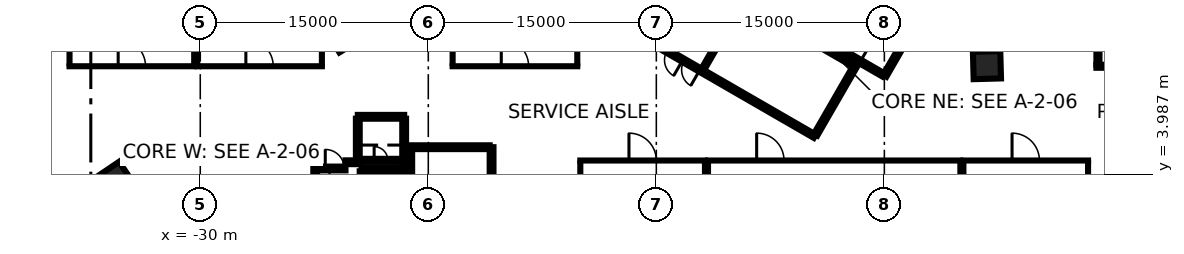
"""IFC4 building model, lengths in metres.
Left out: names, types, materials, properties, quantities, classifications, styles, units other than length and angle.
Written with IfcOpenShell. Run it as: python <this file> out.ifc"""

import sys

from ifc_helpers import new_model, si_unit, direction, frame, frame_2d, origin, origin_2d, place, context, subcontext, project, spatial, rectangle, extrude, element, fill, save


model = new_model("IFC4")
c1 = context("Model", 3, precision=1e-05, world=origin(), true_north=direction((0.0, 1.0)))
c2 = subcontext(c1, "Body", "Model", "MODEL_VIEW")
j1 = project(units=[si_unit("LENGTHUNIT", "METRE"), si_unit("PLANEANGLEUNIT", "RADIAN")], contexts=[c1])
p1 = place(None, origin())
s1 = spatial("IfcSite", under=j1, at=p1, CompositionType="ELEMENT")
p2 = place(p1, origin())
s2 = spatial("IfcBuilding", under=s1, at=p2, CompositionType="ELEMENT")
p3 = place(p2, frame((0.0, 0.0, -7.2)))
s3 = spatial("IfcBuildingStorey", under=s2, at=p3, CompositionType="ELEMENT", Elevation=-7.2)
for number, where, z_axis, x_axis in (
    (1, (21.749, 11.174, -0.4), (0.0, 0.0, 1.0), (1.0, 0.027, 0.0)),
    (2, (-35.583, 3.565, -0.4), (0.0, 0.0, 1.0), (-0.559, 0.829, 0.0)),
):
    element("IfcColumn", number, at=place(p3, frame(where, z_axis=z_axis, x_axis=x_axis)), inside=s3, PredefinedType="COLUMN", context=c2, shape_type="SweptSolid", body=[
        extrude(rectangle(XDim=1.8, YDim=1.8, at=origin_2d()), origin(), (0.0, 0.0, 1.0), 3.6),
    ])
p4 = place(p3, frame((-10.837, 5.775, 0.0), z_axis=(0.0, 0.0, 1.0), x_axis=(0.0, -1.0, 0.0)))
e3 = element("IfcWall", 3, at=p4, inside=s3, PredefinedType="SHEAR", context=c2, shape_type="SweptSolid", body=[
    extrude(rectangle(XDim=11.55, YDim=0.25, at=frame_2d((5.775, 0.0))), origin(), (0.0, 0.0, 1.0), 3.2),
])
p5 = place(p4, frame((10.025, 0.0, 0.0)))
e4 = element("IfcOpeningElement", 4, at=p5, cuts=e3, PredefinedType="OPENING", context=c2, shape_type="SweptSolid", body=[
    extrude(rectangle(XDim=1.2, YDim=2.1, at=frame_2d((0.6, 1.05))), frame((0.0, 0.135, 0.0), z_axis=(0.0, -1.0, 0.0), x_axis=(1.0, 0.0, 0.0)), (0.0, 0.0, 1.0), 0.27),
])
p6 = place(p4, frame((8.725, 0.0, 0.0)))
e5 = element("IfcOpeningElement", 5, at=p6, cuts=e3, PredefinedType="OPENING", context=c2, shape_type="SweptSolid", body=[
    extrude(rectangle(XDim=1.2, YDim=2.1, at=frame_2d((0.6, 1.05))), frame((0.0, 0.135, 0.0), z_axis=(0.0, -1.0, 0.0), x_axis=(1.0, 0.0, 0.0)), (0.0, 0.0, 1.0), 0.27),
])
p7 = place(p3, frame((-16.472, 5.775, 0.0), z_axis=(0.0, 0.0, 1.0), x_axis=(1.0, 0.0, 0.0)))
e6 = element("IfcWall", 6, at=p7, inside=s3, PredefinedType="SHEAR", context=c2, shape_type="SweptSolid", body=[
    extrude(rectangle(XDim=5.51, YDim=0.25, at=frame_2d((2.755, 0.0))), origin(), (0.0, 0.0, 1.0), 3.2),
])
p8 = place(p3, frame((-19.637, 7.775, 0.0), z_axis=(0.0, 0.0, 1.0), x_axis=(1.0, 0.0, 0.0)))
e7 = element("IfcWall", 7, at=p8, inside=s3, PredefinedType="SHEAR", context=c2, shape_type="SweptSolid", body=[
    extrude(rectangle(XDim=3.05, YDim=0.25, at=frame_2d((1.525, 0.0))), origin(), (0.0, 0.0, 1.0), 3.2),
])
for number, where, z_axis, x_axis in (
    (8, (-16.587, 7.65, 0.0), (0.0, 0.0, 1.0), (0.0, -1.0, 0.0)),
    (9, (-19.637, 4.785, 0.0), (0.0, 0.0, 1.0), (0.0, 1.0, 0.0)),
):
    element("IfcWall", number, at=place(p3, frame(where, z_axis=z_axis, x_axis=x_axis)), inside=s3, PredefinedType="SHEAR", context=c2, shape_type="SweptSolid", body=[
        extrude(rectangle(XDim=2.865, YDim=0.25, at=frame_2d((1.432, 0.0))), origin(), (0.0, 0.0, 1.0), 3.2),
    ])
p9 = place(p3, frame((-16.302, 4.315, 0.0), z_axis=(0.0, 0.0, 1.0), x_axis=(-1.0, 0.0, 0.0)))
e10 = element("IfcWall", 10, at=p9, inside=s3, PredefinedType="SHEAR", context=c2, shape_type="SweptSolid", body=[
    extrude(rectangle(XDim=3.085, YDim=0.25, at=frame_2d((1.542, 0.0))), origin(), (0.0, 0.0, 1.0), 3.2),
])
p10 = place(p3, frame((-16.187, 3.2, 0.0), z_axis=(0.0, 0.0, 1.0), x_axis=(0.0, 1.0, 0.0)))
e11 = element("IfcWall", 11, at=p10, inside=s3, PredefinedType="SHEAR", context=c2, shape_type="SweptSolid", body=[
    extrude(rectangle(XDim=2.449, YDim=0.25, at=frame_2d((1.225, 0.0))), origin(), (0.0, 0.0, 1.0), 3.2),
])
p11 = place(p3, frame((-22.437, 2.4, 0.0), z_axis=(0.0, 0.0, 1.0), x_axis=(0.0, 1.0, 0.0)))
e12 = element("IfcWall", 12, at=p11, inside=s3, PredefinedType="SHEAR", context=c2, shape_type="SweptSolid", body=[
    extrude(rectangle(XDim=1.975, YDim=0.25, at=frame_2d((0.987, 0.0))), origin(), (0.0, 0.0, 1.0), 3.2),
])
p12 = place(p3, frame((-22.312, 4.375, 0.0), z_axis=(0.0, 0.0, 1.0), x_axis=(1.0, 0.0, 0.0)))
e13 = element("IfcWall", 13, at=p12, inside=s3, PredefinedType="SHEAR", context=c2, shape_type="SweptSolid", body=[
    extrude(rectangle(XDim=1.865, YDim=0.25, at=frame_2d((0.932, 0.0))), origin(), (0.0, 0.0, 1.0), 3.2),
])
p13 = place(p12, frame((0.535, 0.0, 0.0)))
e14 = element("IfcOpeningElement", 14, at=p13, cuts=e13, PredefinedType="OPENING", context=c2, shape_type="SweptSolid", body=[
    extrude(rectangle(XDim=1.25, YDim=2.1, at=frame_2d((0.625, 1.05))), frame((0.0, 0.135, 0.0), z_axis=(0.0, -1.0, 0.0), x_axis=(1.0, 0.0, 0.0)), (0.0, 0.0, 1.0), 0.27),
])
p14 = place(p3, frame((-19.387, 4.19, 0.0), z_axis=(0.0, 0.0, 1.0), x_axis=(0.0, -1.0, 0.0)))
e15 = element("IfcWall", 15, at=p14, inside=s3, PredefinedType="SHEAR", context=c2, shape_type="SweptSolid", body=[
    extrude(rectangle(XDim=0.989, YDim=0.25, at=frame_2d((0.495, 0.0))), origin(), (0.0, 0.0, 1.0), 3.2),
])
p15 = place(p3, frame((-20.447, 4.785, 0.0), z_axis=(0.0, 0.0, 1.0), x_axis=(1.0, 0.0, 0.0)))
e16 = element("IfcWall", 16, at=p15, inside=s3, PredefinedType="SHEAR", context=c2, shape_type="SweptSolid", body=[
    extrude(rectangle(XDim=0.685, YDim=0.25, at=frame_2d((0.342, 0.0))), origin(), (0.0, 0.0, 1.0), 3.2),
])
p16 = place(p3, frame((-16.577, 4.785, 0.0), z_axis=(0.0, 0.0, 1.0), x_axis=(0.0, -1.0, 0.0)))
e17 = element("IfcWall", 17, at=p16, inside=s3, PredefinedType="SHEAR", context=c2, shape_type="SweptSolid", body=[
    extrude(rectangle(XDim=0.344, YDim=0.25, at=frame_2d((0.172, 0.0))), origin(), (0.0, 0.0, 1.0), 3.2),
])
p17 = place(p3, frame((-19.511, 4.91, 0.0), z_axis=(0.0, 0.0, 1.0), x_axis=(1.0, 0.0, 0.0)))
e18 = element("IfcWall", 18, at=p17, inside=s3, PredefinedType="SHEAR", context=c2, shape_type="SweptSolid", body=[
    extrude(rectangle(XDim=2.798, YDim=0.2, at=frame_2d((1.399, 0.0))), origin(), (0.0, 0.0, 1.0), 3.2),
])
p18 = place(p17, frame((0.949, 0.0, 0.0)))
e19 = element("IfcOpeningElement", 19, at=p18, cuts=e18, PredefinedType="OPENING", context=c2, shape_type="SweptSolid", body=[
    extrude(rectangle(XDim=0.9, YDim=2.1, at=frame_2d((0.45, 1.05))), frame((0.0, 0.11, 0.0), z_axis=(0.0, -1.0, 0.0), x_axis=(1.0, 0.0, 0.0)), (0.0, 0.0, 1.0), 0.22),
])
p19 = place(p3, frame((10.42, 6.498, 0.0), z_axis=(0.0, 0.0, 1.0), x_axis=(-0.866021906294, 0.500006057782, 0.0)))
e20 = element("IfcWall", 20, at=p19, inside=s3, PredefinedType="SHEAR", context=c2, shape_type="SweptSolid", body=[
    extrude(rectangle(XDim=11.55, YDim=0.25, at=frame_2d((5.775, 0.0))), origin(), (0.0, 0.0, 1.0), 3.2),
])
p20 = place(p19, frame((10.025, 0.0, 0.0)))
e21 = element("IfcOpeningElement", 21, at=p20, cuts=e20, PredefinedType="OPENING", context=c2, shape_type="SweptSolid", body=[
    extrude(rectangle(XDim=1.2, YDim=2.1, at=frame_2d((0.6, 1.05))), frame((0.0, 0.135, 0.0), z_axis=(0.0, -1.0, 0.0), x_axis=(1.0, 0.0, 0.0)), (0.0, 0.0, 1.0), 0.27),
])
p21 = place(p19, frame((8.725, 0.0, 0.0)))
e22 = element("IfcOpeningElement", 22, at=p21, cuts=e20, PredefinedType="OPENING", context=c2, shape_type="SweptSolid", body=[
    extrude(rectangle(XDim=1.2, YDim=2.1, at=frame_2d((0.6, 1.05))), frame((0.0, 0.135, 0.0), z_axis=(0.0, -1.0, 0.0), x_axis=(1.0, 0.0, 0.0)), (0.0, 0.0, 1.0), 0.27),
])
p22 = place(p3, frame((13.238, 11.378, 0.0), z_axis=(0.0, 0.0, 1.0), x_axis=(-0.500008851346, -0.866020293397, 0.0)))
e23 = element("IfcWall", 23, at=p22, inside=s3, PredefinedType="SHEAR", context=c2, shape_type="SweptSolid", body=[
    extrude(rectangle(XDim=5.51, YDim=0.25, at=frame_2d((2.755, 0.0))), origin(), (0.0, 0.0, 1.0), 3.2),
])
p23 = place(p3, frame((16.552, 13.119, 0.0), z_axis=(0.0, 0.0, 1.0), x_axis=(-0.499978833458, -0.866037623948, 0.0)))
e24 = element("IfcWall", 24, at=p23, inside=s3, PredefinedType="SHEAR", context=c2, shape_type="SweptSolid", body=[
    extrude(rectangle(XDim=3.05, YDim=0.25, at=frame_2d((1.525, 0.0))), origin(), (0.0, 0.0, 1.0), 3.2),
])
p24 = place(p3, frame((14.918, 10.54, 0.0), z_axis=(0.0, 0.0, 1.0), x_axis=(-0.866063538972, 0.499933942099, 0.0)))
e25 = element("IfcWall", 25, at=p24, inside=s3, PredefinedType="SHEAR", context=c2, shape_type="SweptSolid", body=[
    extrude(rectangle(XDim=2.865, YDim=0.25, at=frame_2d((1.432, 0.0))), origin(), (0.0, 0.0, 1.0), 3.2),
])
p25 = place(p3, frame((11.888, 11.961, 0.0), z_axis=(0.0, 0.0, 1.0), x_axis=(0.500003324108, 0.866023484601, 0.0)))
e26 = element("IfcWall", 26, at=p25, inside=s3, PredefinedType="SHEAR", context=c2, shape_type="SweptSolid", body=[
    extrude(rectangle(XDim=3.085, YDim=0.25, at=frame_2d((1.542, 0.0))), origin(), (0.0, 0.0, 1.0), 3.2),
])
p26 = place(p3, frame((10.865, 12.418, 0.0), z_axis=(0.0, 0.0, 1.0), x_axis=(0.866026229868, -0.499998569178, 0.0)))
e27 = element("IfcWall", 27, at=p26, inside=s3, PredefinedType="SHEAR", context=c2, shape_type="SweptSolid", body=[
    extrude(rectangle(XDim=2.449, YDim=0.25, at=frame_2d((1.225, 0.0))), origin(), (0.0, 0.0, 1.0), 3.2),
])
p27 = place(p3, frame((12.433, 11.964, 0.0), z_axis=(0.0, 0.0, 1.0), x_axis=(-0.866055875208, 0.499947218231, 0.0)))
e28 = element("IfcWall", 28, at=p27, inside=s3, PredefinedType="SHEAR", context=c2, shape_type="SweptSolid", body=[
    extrude(rectangle(XDim=0.345, YDim=0.25, at=frame_2d((0.172, 0.0))), origin(), (0.0, 0.0, 1.0), 3.2),
])
p28 = place(p3, frame((3.057, 10.895, 0.0), z_axis=(0.0, 0.0, 1.0), x_axis=(0.500012186204, 0.866018367962, 0.0)))
e29 = element("IfcWall", 29, at=p28, inside=s3, PredefinedType="SHEAR", context=c2, shape_type="SweptSolid", body=[
    extrude(rectangle(XDim=5.349, YDim=0.2, at=frame_2d((2.674, 0.0))), origin(), (0.0, 0.0, 1.0), 3.2),
])
p29 = place(p28, frame((2.099, 0.0, 0.0)))
e30 = element("IfcOpeningElement", 30, at=p29, cuts=e29, PredefinedType="OPENING", context=c2, shape_type="SweptSolid", body=[
    extrude(rectangle(XDim=0.9, YDim=2.1, at=frame_2d((0.45, 1.05))), frame((0.0, 0.11, 0.0), z_axis=(0.0, -1.0, 0.0), x_axis=(1.0, 0.0, 0.0)), (0.0, 0.0, 1.0), 0.22),
])
p30 = place(p3, frame((14.008, 14.442, 0.0), z_axis=(0.0, 0.0, 1.0), x_axis=(-0.499986818241, -0.866033014143, 0.0)))
e31 = element("IfcWall", 31, at=p30, inside=s3, PredefinedType="SHEAR", context=c2, shape_type="SweptSolid", body=[
    extrude(rectangle(XDim=2.798, YDim=0.2, at=frame_2d((1.399, 0.0))), origin(), (0.0, 0.0, 1.0), 3.2),
])
p31 = place(p30, frame((0.949, 0.0, 0.0)))
e32 = element("IfcOpeningElement", 32, at=p31, cuts=e31, PredefinedType="OPENING", context=c2, shape_type="SweptSolid", body=[
    extrude(rectangle(XDim=0.9, YDim=2.1, at=frame_2d((0.45, 1.05))), frame((0.0, 0.11, 0.0), z_axis=(0.0, -1.0, 0.0), x_axis=(1.0, 0.0, 0.0)), (0.0, 0.0, 1.0), 0.22),
])
p32 = place(p3, frame((-5.1, 4.9, 0.0), z_axis=(0.0, 0.0, 1.0), x_axis=(1.0, 0.0, 0.0)))
e33 = element("IfcWall", 33, at=p32, inside=s3, PredefinedType="PARTITIONING", context=c2, shape_type="SweptSolid", body=[
    extrude(rectangle(XDim=8.4, YDim=0.2, at=frame_2d((4.2, 0.0))), origin(), (0.0, 0.0, 1.0), 3.2),
])
p33 = place(p32, frame((3.3, 0.0, 0.0)))
e34 = element("IfcOpeningElement", 34, at=p33, cuts=e33, PredefinedType="OPENING", context=c2, shape_type="SweptSolid", body=[
    extrude(rectangle(XDim=1.8, YDim=2.1, at=frame_2d((0.9, 1.05))), frame((0.0, 0.11, 0.0), z_axis=(0.0, -1.0, 0.0), x_axis=(1.0, 0.0, 0.0)), (0.0, 0.0, 1.0), 0.22),
])
for number, where, z_axis, x_axis in (
    (35, (-5.0, 0.6, 0.0), (0.0, 0.0, 1.0), (0.0, 1.0, 0.0)),
    (36, (3.2, 0.6, 0.0), (0.0, 0.0, 1.0), (0.0, 1.0, 0.0)),
):
    element("IfcWall", number, at=place(p3, frame(where, z_axis=z_axis, x_axis=x_axis)), inside=s3, PredefinedType="PARTITIONING", context=c2, shape_type="SweptSolid", body=[
        extrude(rectangle(XDim=4.2, YDim=0.2, at=frame_2d((2.1, 0.0))), origin(), (0.0, 0.0, 1.0), 3.2),
    ])
p34 = place(p3, frame((3.3, 4.9, 0.0), z_axis=(0.0, 0.0, 1.0), x_axis=(1.0, 0.0, 0.0)))
e37 = element("IfcWall", 37, at=p34, inside=s3, PredefinedType="PARTITIONING", context=c2, shape_type="SweptSolid", body=[
    extrude(rectangle(XDim=16.8, YDim=0.2, at=frame_2d((8.4, 0.0))), origin(), (0.0, 0.0, 1.0), 3.2),
])
p35 = place(p34, frame((3.3, 0.0, 0.0)))
e38 = element("IfcOpeningElement", 38, at=p35, cuts=e37, PredefinedType="OPENING", context=c2, shape_type="SweptSolid", body=[
    extrude(rectangle(XDim=1.8, YDim=2.1, at=frame_2d((0.9, 1.05))), frame((0.0, 0.11, 0.0), z_axis=(0.0, -1.0, 0.0), x_axis=(1.0, 0.0, 0.0)), (0.0, 0.0, 1.0), 0.22),
])
for number, where, z_axis, x_axis in (
    (39, (3.4, 0.6, 0.0), (0.0, 0.0, 1.0), (0.0, 1.0, 0.0)),
    (40, (20.0, 0.6, 0.0), (0.0, 0.0, 1.0), (0.0, 1.0, 0.0)),
):
    element("IfcWall", number, at=place(p3, frame(where, z_axis=z_axis, x_axis=x_axis)), inside=s3, PredefinedType="PARTITIONING", context=c2, shape_type="SweptSolid", body=[
        extrude(rectangle(XDim=4.2, YDim=0.2, at=frame_2d((2.1, 0.0))), origin(), (0.0, 0.0, 1.0), 3.2),
    ])
p36 = place(p3, frame((20.1, 4.9, 0.0), z_axis=(0.0, 0.0, 1.0), x_axis=(1.0, 0.0, 0.0)))
e41 = element("IfcWall", 41, at=p36, inside=s3, PredefinedType="PARTITIONING", context=c2, shape_type="SweptSolid", body=[
    extrude(rectangle(XDim=8.4, YDim=0.2, at=frame_2d((4.2, 0.0))), origin(), (0.0, 0.0, 1.0), 3.2),
])
p37 = place(p36, frame((3.3, 0.0, 0.0)))
e42 = element("IfcOpeningElement", 42, at=p37, cuts=e41, PredefinedType="OPENING", context=c2, shape_type="SweptSolid", body=[
    extrude(rectangle(XDim=1.8, YDim=2.1, at=frame_2d((0.9, 1.05))), frame((0.0, 0.11, 0.0), z_axis=(0.0, -1.0, 0.0), x_axis=(1.0, 0.0, 0.0)), (0.0, 0.0, 1.0), 0.22),
])
p38 = place(p3, frame((20.2, 0.6, 0.0), z_axis=(0.0, 0.0, 1.0), x_axis=(0.0, 1.0, 0.0)))
e43 = element("IfcWall", 43, at=p38, inside=s3, PredefinedType="PARTITIONING", context=c2, shape_type="SweptSolid", body=[
    extrude(rectangle(XDim=4.2, YDim=0.2, at=frame_2d((2.1, 0.0))), origin(), (0.0, 0.0, 1.0), 3.2),
])
p39 = place(p3, frame((28.4, 0.4, 0.0), z_axis=(0.0, 0.0, 1.0), x_axis=(0.0, 1.0, 0.0)))
e44 = element("IfcWall", 44, at=p39, inside=s3, PredefinedType="PARTITIONING", context=c2, shape_type="SweptSolid", body=[
    extrude(rectangle(XDim=4.4, YDim=0.2, at=frame_2d((2.2, 0.0))), origin(), (0.0, 0.0, 1.0), 3.2),
])
p40 = place(p3, frame((-38.7, 11.1, 0.0), z_axis=(0.0, 0.0, 1.0), x_axis=(1.0, 0.0, 0.0)))
e45 = element("IfcWall", 45, at=p40, inside=s3, PredefinedType="PARTITIONING", context=c2, shape_type="SweptSolid", body=[
    extrude(rectangle(XDim=8.4, YDim=0.2, at=frame_2d((4.2, 0.0))), origin(), (0.0, 0.0, 1.0), 3.2),
])
p41 = place(p40, frame((3.3, 0.0, 0.0)))
e46 = element("IfcOpeningElement", 46, at=p41, cuts=e45, PredefinedType="OPENING", context=c2, shape_type="SweptSolid", body=[
    extrude(rectangle(XDim=1.8, YDim=2.1, at=frame_2d((0.9, 1.05))), frame((0.0, 0.11, 0.0), z_axis=(0.0, -1.0, 0.0), x_axis=(1.0, 0.0, 0.0)), (0.0, 0.0, 1.0), 0.22),
])
p42 = place(p3, frame((-38.6, 11.2, 0.0), z_axis=(0.0, 0.0, 1.0), x_axis=(0.0, 1.0, 0.0)))
e47 = element("IfcWall", 47, at=p42, inside=s3, PredefinedType="PARTITIONING", context=c2, shape_type="SweptSolid", body=[
    extrude(rectangle(XDim=4.2, YDim=0.2, at=frame_2d((2.1, 0.0))), origin(), (0.0, 0.0, 1.0), 3.2),
])
p43 = place(p3, frame((-30.4, 11.2, 0.0), z_axis=(0.0, 0.0, 1.0), x_axis=(0.0, 1.0, 0.0)))
e48 = element("IfcWall", 48, at=p43, inside=s3, PredefinedType="PARTITIONING", context=c2, shape_type="SweptSolid", body=[
    extrude(rectangle(XDim=4.4, YDim=0.2, at=frame_2d((2.2, 0.0))), origin(), (0.0, 0.0, 1.0), 3.2),
])
p44 = place(p3, frame((-30.3, 11.1, 0.0), z_axis=(0.0, 0.0, 1.0), x_axis=(1.0, 0.0, 0.0)))
e49 = element("IfcWall", 49, at=p44, inside=s3, PredefinedType="PARTITIONING", context=c2, shape_type="SweptSolid", body=[
    extrude(rectangle(XDim=8.4, YDim=0.2, at=frame_2d((4.2, 0.0))), origin(), (0.0, 0.0, 1.0), 3.2),
])
p45 = place(p44, frame((3.3, 0.0, 0.0)))
e50 = element("IfcOpeningElement", 50, at=p45, cuts=e49, PredefinedType="OPENING", context=c2, shape_type="SweptSolid", body=[
    extrude(rectangle(XDim=1.8, YDim=2.1, at=frame_2d((0.9, 1.05))), frame((0.0, 0.11, 0.0), z_axis=(0.0, -1.0, 0.0), x_axis=(1.0, 0.0, 0.0)), (0.0, 0.0, 1.0), 0.22),
])
p46 = place(p3, frame((-30.2, 11.2, 0.0), z_axis=(0.0, 0.0, 1.0), x_axis=(0.0, 1.0, 0.0)))
e51 = element("IfcWall", 51, at=p46, inside=s3, PredefinedType="PARTITIONING", context=c2, shape_type="SweptSolid", body=[
    extrude(rectangle(XDim=4.4, YDim=0.2, at=frame_2d((2.2, 0.0))), origin(), (0.0, 0.0, 1.0), 3.2),
])
p47 = place(p3, frame((-22.0, 11.2, 0.0), z_axis=(0.0, 0.0, 1.0), x_axis=(0.0, 1.0, 0.0)))
e52 = element("IfcWall", 52, at=p47, inside=s3, PredefinedType="PARTITIONING", context=c2, shape_type="SweptSolid", body=[
    extrude(rectangle(XDim=4.2, YDim=0.2, at=frame_2d((2.1, 0.0))), origin(), (0.0, 0.0, 1.0), 3.2),
])
p48 = place(p3, frame((-13.5, 11.1, 0.0), z_axis=(0.0, 0.0, 1.0), x_axis=(1.0, 0.0, 0.0)))
e53 = element("IfcWall", 53, at=p48, inside=s3, PredefinedType="PARTITIONING", context=c2, shape_type="SweptSolid", body=[
    extrude(rectangle(XDim=8.4, YDim=0.2, at=frame_2d((4.2, 0.0))), origin(), (0.0, 0.0, 1.0), 3.2),
])
p49 = place(p48, frame((3.3, 0.0, 0.0)))
e54 = element("IfcOpeningElement", 54, at=p49, cuts=e53, PredefinedType="OPENING", context=c2, shape_type="SweptSolid", body=[
    extrude(rectangle(XDim=1.8, YDim=2.1, at=frame_2d((0.9, 1.05))), frame((0.0, 0.11, 0.0), z_axis=(0.0, -1.0, 0.0), x_axis=(1.0, 0.0, 0.0)), (0.0, 0.0, 1.0), 0.22),
])
for number, where, z_axis, x_axis in (
    (55, (-13.4, 11.2, 0.0), (0.0, 0.0, 1.0), (0.0, 1.0, 0.0)),
    (56, (-5.2, 11.2, 0.0), (0.0, 0.0, 1.0), (0.0, 1.0, 0.0)),
):
    element("IfcWall", number, at=place(p3, frame(where, z_axis=z_axis, x_axis=x_axis)), inside=s3, PredefinedType="PARTITIONING", context=c2, shape_type="SweptSolid", body=[
        extrude(rectangle(XDim=4.2, YDim=0.2, at=frame_2d((2.1, 0.0))), origin(), (0.0, 0.0, 1.0), 3.2),
    ])
p50 = place(p3, frame((29.05, 11.2, 0.0), z_axis=(0.0, 0.0, 1.0), x_axis=(0.0, 1.0, 0.0)))
e57 = element("IfcWall", 57, at=p50, inside=s3, PredefinedType="SOLIDWALL", context=c2, shape_type="SweptSolid", body=[
    extrude(rectangle(XDim=9.6, YDim=0.2, at=frame_2d((4.8, 0.0))), origin(), (0.0, 0.0, 1.0), 3.2),
])
p51 = place(p3, frame((33.5, 11.1, 0.0), z_axis=(0.0, 0.0, 1.0), x_axis=(-1.0, 0.0, 0.0)))
e58 = element("IfcWall", 58, at=p51, inside=s3, PredefinedType="SOLIDWALL", context=c2, shape_type="SweptSolid", body=[
    extrude(rectangle(XDim=4.55, YDim=0.2, at=frame_2d((2.275, 0.0))), origin(), (0.0, 0.0, 1.0), 3.2),
])
p52 = place(p13, origin())
e59 = element("IfcDoor", 59, at=p52, inside=s3, OperationType="SINGLE_SWING_LEFT", PredefinedType="DOOR", context=c2, shape_type="SweptSolid", body=[
    extrude(rectangle(XDim=1.25, YDim=2.1, at=frame_2d((0.625, 1.05))), frame((0.0, 0.025, 0.0), z_axis=(0.0, -1.0, 0.0), x_axis=(1.0, 0.0, 0.0)), (0.0, 0.0, 1.0), 0.05),
])
fill(e14, e59)
p53 = place(p18, origin())
e60 = element("IfcDoor", 60, at=p53, inside=s3, OperationType="SINGLE_SWING_LEFT", PredefinedType="DOOR", context=c2, shape_type="SweptSolid", body=[
    extrude(rectangle(XDim=0.9, YDim=2.1, at=frame_2d((0.45, 1.05))), frame((0.0, 0.025, 0.0), z_axis=(0.0, -1.0, 0.0), x_axis=(1.0, 0.0, 0.0)), (0.0, 0.0, 1.0), 0.05),
])
fill(e19, e60)
p54 = place(p20, origin())
e61 = element("IfcDoor", 61, at=p54, inside=s3, OperationType="SINGLE_SWING_LEFT", PredefinedType="DOOR", context=c2, shape_type="SweptSolid", body=[
    extrude(rectangle(XDim=1.2, YDim=2.1, at=frame_2d((0.6, 1.05))), frame((0.0, 0.025, 0.0), z_axis=(0.0, -1.0, 0.0), x_axis=(1.0, 0.0, 0.0)), (0.0, 0.0, 1.0), 0.05),
])
fill(e21, e61)
p55 = place(p21, origin())
e62 = element("IfcDoor", 62, at=p55, inside=s3, OperationType="SINGLE_SWING_RIGHT", PredefinedType="DOOR", context=c2, shape_type="SweptSolid", body=[
    extrude(rectangle(XDim=1.2, YDim=2.1, at=frame_2d((0.6, 1.05))), frame((0.0, 0.025, 0.0), z_axis=(0.0, -1.0, 0.0), x_axis=(1.0, 0.0, 0.0)), (0.0, 0.0, 1.0), 0.05),
])
fill(e22, e62)
p56 = place(p33, origin())
e63 = element("IfcDoor", 63, at=p56, inside=s3, OperationType="DOUBLE_DOOR_SINGLE_SWING", PredefinedType="DOOR", context=c2, shape_type="SweptSolid", body=[
    extrude(rectangle(XDim=1.8, YDim=2.1, at=frame_2d((0.9, 1.05))), frame((0.0, 0.025, 0.0), z_axis=(0.0, -1.0, 0.0), x_axis=(1.0, 0.0, 0.0)), (0.0, 0.0, 1.0), 0.05),
])
fill(e34, e63)
p57 = place(p35, origin())
e64 = element("IfcDoor", 64, at=p57, inside=s3, OperationType="DOUBLE_DOOR_SINGLE_SWING", PredefinedType="DOOR", context=c2, shape_type="SweptSolid", body=[
    extrude(rectangle(XDim=1.8, YDim=2.1, at=frame_2d((0.9, 1.05))), frame((0.0, 0.025, 0.0), z_axis=(0.0, -1.0, 0.0), x_axis=(1.0, 0.0, 0.0)), (0.0, 0.0, 1.0), 0.05),
])
fill(e38, e64)
p58 = place(p37, origin())
e65 = element("IfcDoor", 65, at=p58, inside=s3, OperationType="DOUBLE_DOOR_SINGLE_SWING", PredefinedType="DOOR", context=c2, shape_type="SweptSolid", body=[
    extrude(rectangle(XDim=1.8, YDim=2.1, at=frame_2d((0.9, 1.05))), frame((0.0, 0.025, 0.0), z_axis=(0.0, -1.0, 0.0), x_axis=(1.0, 0.0, 0.0)), (0.0, 0.0, 1.0), 0.05),
])
fill(e42, e65)
p59 = place(p41, origin())
e66 = element("IfcDoor", 66, at=p59, inside=s3, OperationType="DOUBLE_DOOR_SINGLE_SWING", PredefinedType="DOOR", context=c2, shape_type="SweptSolid", body=[
    extrude(rectangle(XDim=1.8, YDim=2.1, at=frame_2d((0.9, 1.05))), frame((0.0, 0.025, 0.0), z_axis=(0.0, -1.0, 0.0), x_axis=(1.0, 0.0, 0.0)), (0.0, 0.0, 1.0), 0.05),
])
fill(e46, e66)
p60 = place(p45, origin())
e67 = element("IfcDoor", 67, at=p60, inside=s3, OperationType="DOUBLE_DOOR_SINGLE_SWING", PredefinedType="DOOR", context=c2, shape_type="SweptSolid", body=[
    extrude(rectangle(XDim=1.8, YDim=2.1, at=frame_2d((0.9, 1.05))), frame((0.0, 0.025, 0.0), z_axis=(0.0, -1.0, 0.0), x_axis=(1.0, 0.0, 0.0)), (0.0, 0.0, 1.0), 0.05),
])
fill(e50, e67)
p61 = place(p49, origin())
e68 = element("IfcDoor", 68, at=p61, inside=s3, OperationType="DOUBLE_DOOR_SINGLE_SWING", PredefinedType="DOOR", context=c2, shape_type="SweptSolid", body=[
    extrude(rectangle(XDim=1.8, YDim=2.1, at=frame_2d((0.9, 1.05))), frame((0.0, 0.025, 0.0), z_axis=(0.0, -1.0, 0.0), x_axis=(1.0, 0.0, 0.0)), (0.0, 0.0, 1.0), 0.05),
])
fill(e54, e68)
save(model, sys.argv[1])
